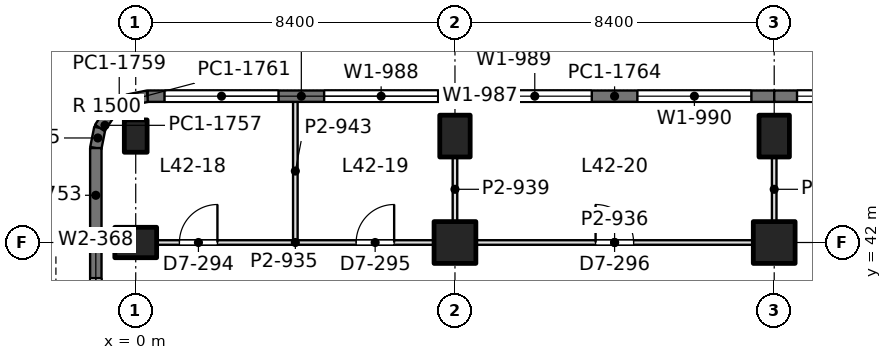
"""IFC4 building model, lengths in metres.
Left out: names, types, materials, properties, quantities, classifications, styles, units other than length and angle.
Written with IfcOpenShell. Run it as: python <this file> out.ifc"""

import sys

from ifc_helpers import new_model, si_unit, direction, frame, frame_2d, origin, origin_2d, place, context, subcontext, project, spatial, rectangle, extrude, element, fill, save


model = new_model("IFC4")
c1 = context("Model", 3, precision=1e-05, world=origin(), true_north=direction((0.0, 1.0)))
c2 = subcontext(c1, "Body", "Model", "MODEL_VIEW")
j1 = project(units=[si_unit("LENGTHUNIT", "METRE"), si_unit("PLANEANGLEUNIT", "RADIAN")], contexts=[c1])
p1 = place(None, origin())
s1 = spatial("IfcSite", under=j1, at=p1, CompositionType="ELEMENT")
p2 = place(p1, origin())
s2 = spatial("IfcBuilding", under=s1, at=p2, CompositionType="ELEMENT")
p3 = place(p2, frame((0.0, 0.0, 186.0)))
s3 = spatial("IfcBuildingStorey", under=s2, at=p3, CompositionType="ELEMENT", Elevation=186.0)
p4 = place(p3, frame((0.0, 42.0, 0.0), z_axis=(0.0, 0.0, 1.0), x_axis=(0.0, 1.0, 0.0)))
e1 = element("IfcColumn", 1, at=p4, inside=s3, PredefinedType="COLUMN", context=c2, shape_type="SweptSolid", body=[
    extrude(rectangle(XDim=0.8, YDim=1.1, at=origin_2d()), origin(), (0.0, 0.0, 1.0), 4.2),
])
p5 = place(p3, frame((0.0, 44.8, 0.0), z_axis=(0.0, 0.0, 1.0), x_axis=(1.0, 0.0, 0.0)))
e2 = element("IfcColumn", 2, at=p5, inside=s3, PredefinedType="COLUMN", context=c2, shape_type="SweptSolid", body=[
    extrude(rectangle(XDim=0.6, YDim=0.85, at=origin_2d()), origin(), (0.0, 0.0, 1.0), 4.2),
])
p6 = place(p3, frame((8.4, 42.0, 0.0), z_axis=(0.0, 0.0, 1.0), x_axis=(1.0, 0.0, 0.0)))
e3 = element("IfcColumn", 3, at=p6, inside=s3, PredefinedType="COLUMN", context=c2, shape_type="SweptSolid", body=[
    extrude(rectangle(XDim=1.1, YDim=1.1, at=origin_2d()), origin(), (0.0, 0.0, 1.0), 4.2),
])
p7 = place(p3, frame((8.4, 44.8, 0.0), z_axis=(0.0, 0.0, 1.0), x_axis=(1.0, 0.0, 0.0)))
e4 = element("IfcColumn", 4, at=p7, inside=s3, PredefinedType="COLUMN", context=c2, shape_type="SweptSolid", body=[
    extrude(rectangle(XDim=0.8, YDim=1.1, at=origin_2d()), origin(), (0.0, 0.0, 1.0), 4.2),
])
p8 = place(p3, frame((16.8, 42.0, 0.0), z_axis=(0.0, 0.0, 1.0), x_axis=(1.0, 0.0, 0.0)))
e5 = element("IfcColumn", 5, at=p8, inside=s3, PredefinedType="COLUMN", context=c2, shape_type="SweptSolid", body=[
    extrude(rectangle(XDim=1.1, YDim=1.1, at=origin_2d()), origin(), (0.0, 0.0, 1.0), 4.2),
])
p9 = place(p3, frame((16.8, 44.8, 0.0), z_axis=(0.0, 0.0, 1.0), x_axis=(1.0, 0.0, 0.0)))
e6 = element("IfcColumn", 6, at=p9, inside=s3, PredefinedType="COLUMN", context=c2, shape_type="SweptSolid", body=[
    extrude(rectangle(XDim=0.8, YDim=1.1, at=origin_2d()), origin(), (0.0, 0.0, 1.0), 4.2),
])
p10 = place(p3, frame((-1.05, 37.725, 0.0), z_axis=(0.0, 0.0, 1.0), x_axis=(0.0, 1.0, 0.0)))
e7 = element("IfcWall", 7, at=p10, inside=s3, PredefinedType="SOLIDWALL", context=c2, shape_type="SweptSolid", body=[
    extrude(rectangle(XDim=4.275, YDim=0.3, at=frame_2d((2.137, 0.0))), origin(), (0.0, 0.0, 1.0), 4.05),
])
p11 = place(p10, frame((0.938, 0.0, 0.9)))
e8 = element("IfcOpeningElement", 8, at=p11, cuts=e7, PredefinedType="OPENING", context=c2, shape_type="SweptSolid", body=[
    extrude(rectangle(XDim=2.4, YDim=1.9, at=frame_2d((1.2, 0.95))), frame((0.0, 0.16, 0.0), z_axis=(0.0, -1.0, 0.0), x_axis=(1.0, 0.0, 0.0)), (0.0, 0.0, 1.0), 0.32),
])
p12 = place(p3, frame((-1.05, 42.0, 0.0), z_axis=(0.0, 0.0, 1.0), x_axis=(0.0, 1.0, 0.0)))
e9 = element("IfcWall", 9, at=p12, inside=s3, PredefinedType="SOLIDWALL", context=c2, shape_type="SweptSolid", body=[
    extrude(rectangle(XDim=2.485, YDim=0.3, at=frame_2d((1.243, 0.0))), origin(), (0.0, 0.0, 1.0), 4.05),
])
p13 = place(p3, frame((-1.05, 44.485, 0.0), z_axis=(0.0, 0.0, 1.0), x_axis=(0.195073962632, 0.980788534345, 0.0)))
e10 = element("IfcWall", 10, at=p13, inside=s3, PredefinedType="SOLIDWALL", context=c2, shape_type="SweptSolid", body=[
    extrude(rectangle(XDim=0.541, YDim=0.3, at=frame_2d((0.271, 0.0))), origin(), (0.0, 0.0, 1.0), 4.05),
])
p14 = place(p3, frame((-0.945, 45.015, 0.0), z_axis=(0.0, 0.0, 1.0), x_axis=(0.55534295404, 0.831621430339, 0.0)))
e11 = element("IfcWall", 11, at=p14, inside=s3, PredefinedType="SOLIDWALL", context=c2, shape_type="SweptSolid", body=[
    extrude(rectangle(XDim=0.526, YDim=0.3, at=frame_2d((0.263, 0.0))), origin(), (0.0, 0.0, 1.0), 4.05),
])
p15 = place(p3, frame((-0.653, 45.453, 0.0), z_axis=(0.0, 0.0, 1.0), x_axis=(0.831692711774, 0.555236195849, 0.0)))
e12 = element("IfcWall", 12, at=p15, inside=s3, PredefinedType="SOLIDWALL", context=c2, shape_type="SweptSolid", body=[
    extrude(rectangle(XDim=0.525, YDim=0.3, at=frame_2d((0.263, 0.0))), origin(), (0.0, 0.0, 1.0), 4.05),
])
p16 = place(p3, frame((-0.216, 45.744, 0.0), z_axis=(0.0, 0.0, 1.0), x_axis=(0.980702050465, 0.1955082817, 0.0)))
e13 = element("IfcWall", 13, at=p16, inside=s3, PredefinedType="SOLIDWALL", context=c2, shape_type="SweptSolid", body=[
    extrude(rectangle(XDim=0.541, YDim=0.3, at=frame_2d((0.271, 0.0))), origin(), (0.0, 0.0, 1.0), 4.05),
])
p17 = place(p3, frame((0.315, 45.85, 0.0), z_axis=(0.0, 0.0, 1.0), x_axis=(1.0, 0.0, 0.0)))
e14 = element("IfcWall", 14, at=p17, inside=s3, PredefinedType="SOLIDWALL", context=c2, shape_type="SweptSolid", body=[
    extrude(rectangle(XDim=8.085, YDim=0.3, at=frame_2d((4.042, 0.0))), origin(), (0.0, 0.0, 1.0), 4.05),
])
p18 = place(p17, frame((0.443, 0.0, 0.9)))
e15 = element("IfcOpeningElement", 15, at=p18, cuts=e14, PredefinedType="OPENING", context=c2, shape_type="SweptSolid", body=[
    extrude(rectangle(XDim=3.0, YDim=1.9, at=frame_2d((1.5, 0.95))), frame((0.0, 0.16, 0.0), z_axis=(0.0, -1.0, 0.0), x_axis=(1.0, 0.0, 0.0)), (0.0, 0.0, 1.0), 0.32),
])
p19 = place(p17, frame((4.643, 0.0, 0.9)))
e16 = element("IfcOpeningElement", 16, at=p19, cuts=e14, PredefinedType="OPENING", context=c2, shape_type="SweptSolid", body=[
    extrude(rectangle(XDim=3.0, YDim=1.9, at=frame_2d((1.5, 0.95))), frame((0.0, 0.16, 0.0), z_axis=(0.0, -1.0, 0.0), x_axis=(1.0, 0.0, 0.0)), (0.0, 0.0, 1.0), 0.32),
])
p20 = place(p3, frame((8.4, 45.85, 0.0), z_axis=(0.0, 0.0, 1.0), x_axis=(1.0, 0.0, 0.0)))
e17 = element("IfcWall", 17, at=p20, inside=s3, PredefinedType="SOLIDWALL", context=c2, shape_type="SweptSolid", body=[
    extrude(rectangle(XDim=8.4, YDim=0.3, at=frame_2d((4.2, 0.0))), origin(), (0.0, 0.0, 1.0), 4.05),
])
p21 = place(p20, frame((0.6, 0.0, 0.9)))
e18 = element("IfcOpeningElement", 18, at=p21, cuts=e17, PredefinedType="OPENING", context=c2, shape_type="SweptSolid", body=[
    extrude(rectangle(XDim=3.0, YDim=1.9, at=frame_2d((1.5, 0.95))), frame((0.0, 0.16, 0.0), z_axis=(0.0, -1.0, 0.0), x_axis=(1.0, 0.0, 0.0)), (0.0, 0.0, 1.0), 0.32),
])
p22 = place(p20, frame((4.8, 0.0, 0.9)))
e19 = element("IfcOpeningElement", 19, at=p22, cuts=e17, PredefinedType="OPENING", context=c2, shape_type="SweptSolid", body=[
    extrude(rectangle(XDim=3.0, YDim=1.9, at=frame_2d((1.5, 0.95))), frame((0.0, 0.16, 0.0), z_axis=(0.0, -1.0, 0.0), x_axis=(1.0, 0.0, 0.0)), (0.0, 0.0, 1.0), 0.32),
])
p23 = place(p3, frame((16.8, 45.85, 0.0), z_axis=(0.0, 0.0, 1.0), x_axis=(1.0, 0.0, 0.0)))
e20 = element("IfcWall", 20, at=p23, inside=s3, PredefinedType="SOLIDWALL", context=c2, shape_type="SweptSolid", body=[
    extrude(rectangle(XDim=8.4, YDim=0.3, at=frame_2d((4.2, 0.0))), origin(), (0.0, 0.0, 1.0), 4.05),
])
p24 = place(p23, frame((0.6, 0.0, 0.9)))
e21 = element("IfcOpeningElement", 21, at=p24, cuts=e20, PredefinedType="OPENING", context=c2, shape_type="SweptSolid", body=[
    extrude(rectangle(XDim=3.0, YDim=1.9, at=frame_2d((1.5, 0.95))), frame((0.0, 0.16, 0.0), z_axis=(0.0, -1.0, 0.0), x_axis=(1.0, 0.0, 0.0)), (0.0, 0.0, 1.0), 0.32),
])
p25 = place(p23, frame((4.8, 0.0, 0.9)))
e22 = element("IfcOpeningElement", 22, at=p25, cuts=e20, PredefinedType="OPENING", context=c2, shape_type="SweptSolid", body=[
    extrude(rectangle(XDim=3.0, YDim=1.9, at=frame_2d((1.5, 0.95))), frame((0.0, 0.16, 0.0), z_axis=(0.0, -1.0, 0.0), x_axis=(1.0, 0.0, 0.0)), (0.0, 0.0, 1.0), 0.32),
])
p26 = place(p3, frame((0.549, 42.0, 0.0), z_axis=(0.0, 0.0, 1.0), x_axis=(1.0, 0.0, 0.0)))
e23 = element("IfcWall", 23, at=p26, inside=s3, PredefinedType="PARTITIONING", context=c2, shape_type="SweptSolid", body=[
    extrude(rectangle(XDim=7.302, YDim=0.12, at=frame_2d((3.651, 0.0))), origin(), (0.0, 0.0, 1.0), 3.55),
])
p27 = place(p26, frame((0.601, 0.0, 0.0)))
e24 = element("IfcOpeningElement", 24, at=p27, cuts=e23, PredefinedType="OPENING", context=c2, shape_type="SweptSolid", body=[
    extrude(rectangle(XDim=1.0, YDim=2.4, at=frame_2d((0.5, 1.2))), frame((0.0, 0.07, 0.0), z_axis=(0.0, -1.0, 0.0), x_axis=(1.0, 0.0, 0.0)), (0.0, 0.0, 1.0), 0.14),
])
p28 = place(p26, frame((5.251, 0.0, 0.0)))
e25 = element("IfcOpeningElement", 25, at=p28, cuts=e23, PredefinedType="OPENING", context=c2, shape_type="SweptSolid", body=[
    extrude(rectangle(XDim=1.0, YDim=2.4, at=frame_2d((0.5, 1.2))), frame((0.0, 0.07, 0.0), z_axis=(0.0, -1.0, 0.0), x_axis=(1.0, 0.0, 0.0)), (0.0, 0.0, 1.0), 0.14),
])
p29 = place(p3, frame((8.949, 42.0, 0.0), z_axis=(0.0, 0.0, 1.0), x_axis=(1.0, 0.0, 0.0)))
e26 = element("IfcWall", 26, at=p29, inside=s3, PredefinedType="PARTITIONING", context=c2, shape_type="SweptSolid", body=[
    extrude(rectangle(XDim=7.302, YDim=0.12, at=frame_2d((3.651, 0.0))), origin(), (0.0, 0.0, 1.0), 3.55),
])
p30 = place(p29, frame((3.151, 0.0, 0.0)))
e27 = element("IfcOpeningElement", 27, at=p30, cuts=e26, PredefinedType="OPENING", context=c2, shape_type="SweptSolid", body=[
    extrude(rectangle(XDim=1.0, YDim=2.4, at=frame_2d((0.5, 1.2))), frame((0.0, 0.07, 0.0), z_axis=(0.0, -1.0, 0.0), x_axis=(1.0, 0.0, 0.0)), (0.0, 0.0, 1.0), 0.14),
])
p31 = place(p3, frame((4.2, 42.058, 0.0), z_axis=(0.0, 0.0, 1.0), x_axis=(0.0, 1.0, 0.0)))
e28 = element("IfcWall", 28, at=p31, inside=s3, PredefinedType="PARTITIONING", context=c2, shape_type="SweptSolid", body=[
    extrude(rectangle(XDim=3.644, YDim=0.12, at=frame_2d((1.822, 0.0))), origin(), (0.0, 0.0, 1.0), 3.55),
])
for number, where, z_axis, x_axis in (
    (29, (8.4, 42.549, 0.0), (0.0, 0.0, 1.0), (0.0, 1.0, 0.0)),
    (30, (16.8, 42.549, 0.0), (0.0, 0.0, 1.0), (0.0, 1.0, 0.0)),
):
    element("IfcWall", number, at=place(p3, frame(where, z_axis=z_axis, x_axis=x_axis)), inside=s3, PredefinedType="PARTITIONING", context=c2, shape_type="SweptSolid", body=[
        extrude(rectangle(XDim=1.702, YDim=0.12, at=frame_2d((0.851, 0.0))), origin(), (0.0, 0.0, 1.0), 3.69),
    ])
p32 = place(p11, origin())
e31 = element("IfcWindow", 31, at=p32, inside=s3, PartitioningType="SINGLE_PANEL", PredefinedType="WINDOW", context=c2, shape_type="SweptSolid", body=[
    extrude(rectangle(XDim=2.4, YDim=1.9, at=frame_2d((1.2, 0.95))), frame((0.0, 0.03, 0.0), z_axis=(0.0, -1.0, 0.0), x_axis=(1.0, 0.0, 0.0)), (0.0, 0.0, 1.0), 0.06),
])
fill(e8, e31)
p33 = place(p18, origin())
e32 = element("IfcWindow", 32, at=p33, inside=s3, PartitioningType="SINGLE_PANEL", PredefinedType="WINDOW", context=c2, shape_type="SweptSolid", body=[
    extrude(rectangle(XDim=3.0, YDim=1.9, at=frame_2d((1.5, 0.95))), frame((0.0, 0.03, 0.0), z_axis=(0.0, -1.0, 0.0), x_axis=(1.0, 0.0, 0.0)), (0.0, 0.0, 1.0), 0.06),
])
fill(e15, e32)
p34 = place(p19, origin())
e33 = element("IfcWindow", 33, at=p34, inside=s3, PartitioningType="SINGLE_PANEL", PredefinedType="WINDOW", context=c2, shape_type="SweptSolid", body=[
    extrude(rectangle(XDim=3.0, YDim=1.9, at=frame_2d((1.5, 0.95))), frame((0.0, 0.03, 0.0), z_axis=(0.0, -1.0, 0.0), x_axis=(1.0, 0.0, 0.0)), (0.0, 0.0, 1.0), 0.06),
])
fill(e16, e33)
p35 = place(p21, origin())
e34 = element("IfcWindow", 34, at=p35, inside=s3, PartitioningType="SINGLE_PANEL", PredefinedType="WINDOW", context=c2, shape_type="SweptSolid", body=[
    extrude(rectangle(XDim=3.0, YDim=1.9, at=frame_2d((1.5, 0.95))), frame((0.0, 0.03, 0.0), z_axis=(0.0, -1.0, 0.0), x_axis=(1.0, 0.0, 0.0)), (0.0, 0.0, 1.0), 0.06),
])
fill(e18, e34)
p36 = place(p22, origin())
e35 = element("IfcWindow", 35, at=p36, inside=s3, PartitioningType="SINGLE_PANEL", PredefinedType="WINDOW", context=c2, shape_type="SweptSolid", body=[
    extrude(rectangle(XDim=3.0, YDim=1.9, at=frame_2d((1.5, 0.95))), frame((0.0, 0.03, 0.0), z_axis=(0.0, -1.0, 0.0), x_axis=(1.0, 0.0, 0.0)), (0.0, 0.0, 1.0), 0.06),
])
fill(e19, e35)
p37 = place(p24, origin())
e36 = element("IfcWindow", 36, at=p37, inside=s3, PartitioningType="SINGLE_PANEL", PredefinedType="WINDOW", context=c2, shape_type="SweptSolid", body=[
    extrude(rectangle(XDim=3.0, YDim=1.9, at=frame_2d((1.5, 0.95))), frame((0.0, 0.03, 0.0), z_axis=(0.0, -1.0, 0.0), x_axis=(1.0, 0.0, 0.0)), (0.0, 0.0, 1.0), 0.06),
])
fill(e21, e36)
p38 = place(p27, origin())
e37 = element("IfcDoor", 37, at=p38, inside=s3, OperationType="SINGLE_SWING_RIGHT", PredefinedType="DOOR", context=c2, shape_type="SweptSolid", body=[
    extrude(rectangle(XDim=1.0, YDim=2.4, at=frame_2d((0.5, 1.2))), frame((0.0, 0.025, 0.0), z_axis=(0.0, -1.0, 0.0), x_axis=(1.0, 0.0, 0.0)), (0.0, 0.0, 1.0), 0.05),
])
fill(e24, e37)
p39 = place(p28, origin())
e38 = element("IfcDoor", 38, at=p39, inside=s3, OperationType="SINGLE_SWING_RIGHT", PredefinedType="DOOR", context=c2, shape_type="SweptSolid", body=[
    extrude(rectangle(XDim=1.0, YDim=2.4, at=frame_2d((0.5, 1.2))), frame((0.0, 0.025, 0.0), z_axis=(0.0, -1.0, 0.0), x_axis=(1.0, 0.0, 0.0)), (0.0, 0.0, 1.0), 0.05),
])
fill(e25, e38)
p40 = place(p30, origin())
e39 = element("IfcDoor", 39, at=p40, inside=s3, OperationType="SINGLE_SWING_LEFT", PredefinedType="DOOR", context=c2, shape_type="SweptSolid", body=[
    extrude(rectangle(XDim=1.0, YDim=2.4, at=frame_2d((0.5, 1.2))), frame((0.0, 0.025, 0.0), z_axis=(0.0, -1.0, 0.0), x_axis=(1.0, 0.0, 0.0)), (0.0, 0.0, 1.0), 0.05),
])
fill(e27, e39)
save(model, sys.argv[1])
